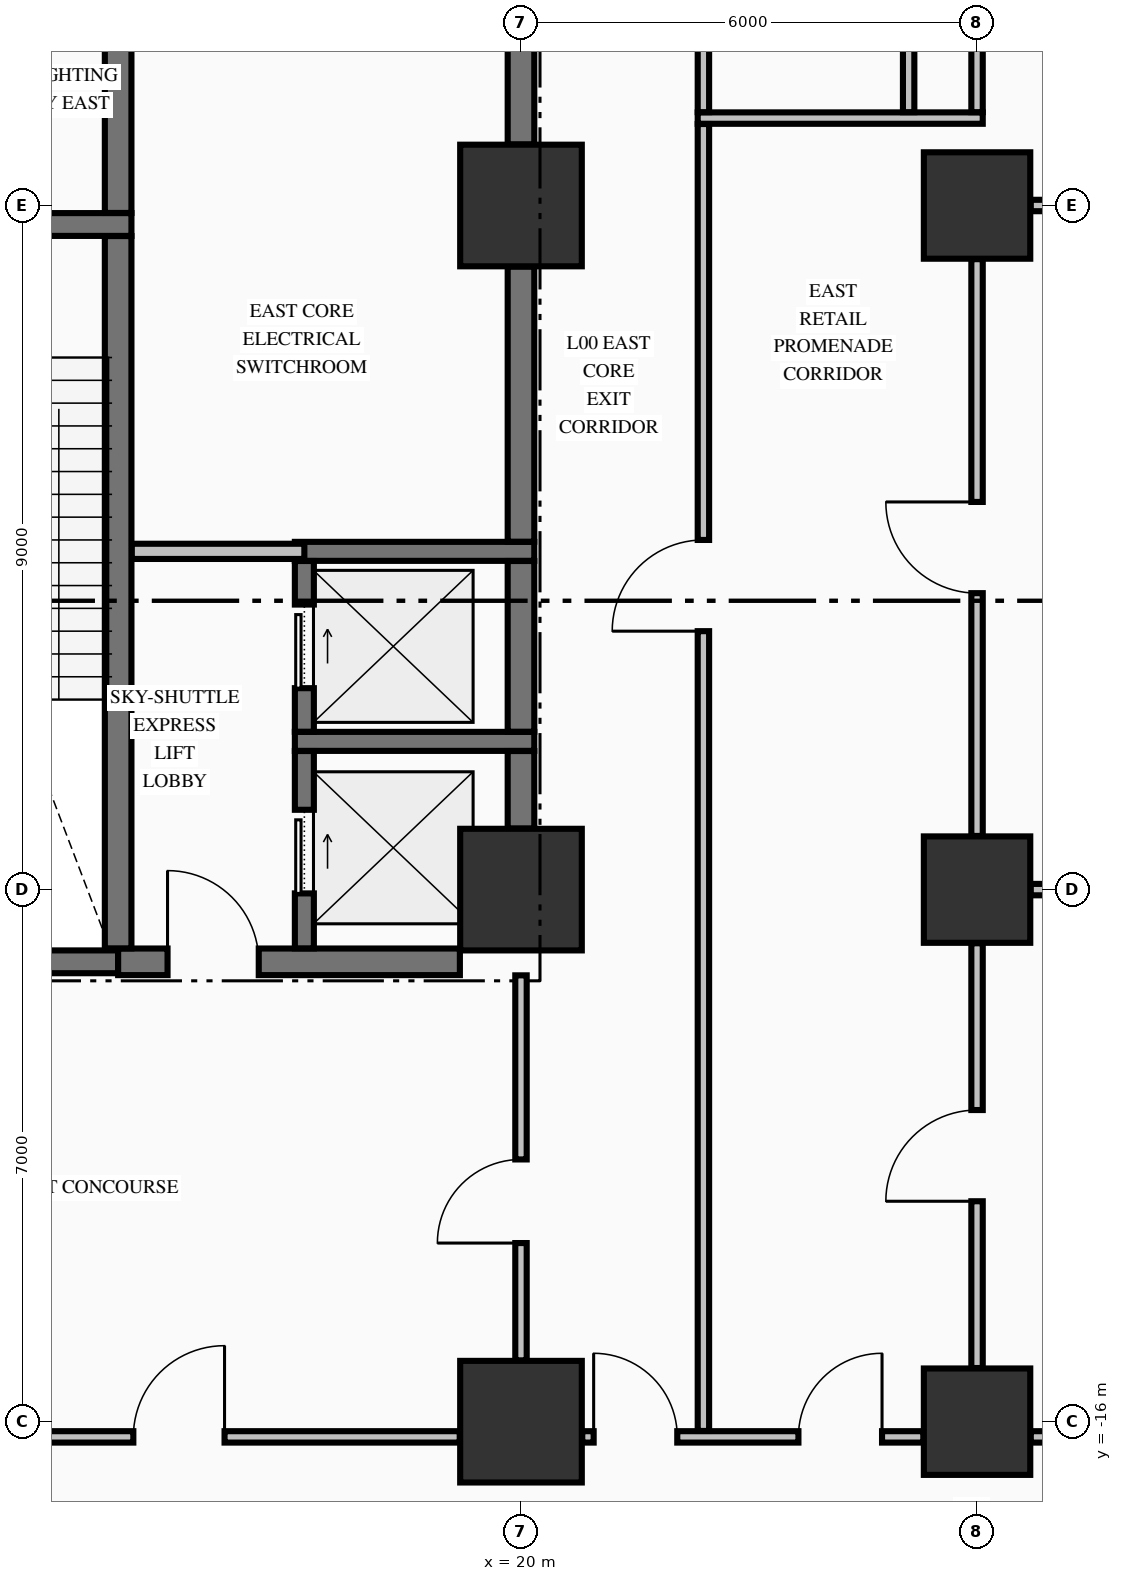
"""IFC4 building model, lengths in metres.
Left out: names, types, materials, properties, quantities, classifications, styles, units other than length and angle.
Written with IfcOpenShell. Run it as: python <this file> out.ifc"""

import sys

from ifc_helpers import new_model, si_unit, direction, frame, frame_2d, origin, origin_2d, place, context, subcontext, project, spatial, rectangle, extrude, element, fill, save


model = new_model("IFC4")
c1 = context("Model", 3, precision=1e-05, world=origin(), true_north=direction((0.0, 1.0)))
c2 = subcontext(c1, "Body", "Model", "MODEL_VIEW")
j1 = project(units=[si_unit("LENGTHUNIT", "METRE"), si_unit("PLANEANGLEUNIT", "RADIAN")], contexts=[c1])
p1 = place(None, origin())
s1 = spatial("IfcSite", under=j1, at=p1, CompositionType="ELEMENT")
p2 = place(p1, origin())
s2 = spatial("IfcBuilding", under=s1, at=p2, CompositionType="ELEMENT")
p3 = place(p2, origin())
s3 = spatial("IfcBuildingStorey", under=s2, at=p3, CompositionType="ELEMENT", Elevation=0.0)
for number, where, z_axis, x_axis in (
    (1, (20.0, -16.0, 0.0), (0.0, 0.0, 1.0), (1.0, 0.0, 0.0)),
    (2, (20.0, -9.0, 0.0), (0.0, 0.0, 1.0), (1.0, 0.0, 0.0)),
    (3, (20.0, 0.0, 0.0), (0.0, 0.0, 1.0), (1.0, 0.0, 0.0)),
):
    element("IfcColumn", number, at=place(p3, frame(where, z_axis=z_axis, x_axis=x_axis)), inside=s3, PredefinedType="COLUMN", context=c2, shape_type="SweptSolid", body=[
        extrude(rectangle(XDim=1.6, YDim=1.6, at=origin_2d()), origin(), (0.0, 0.0, 1.0), 5.09),
    ])
for number, where, z_axis, x_axis in (
    (4, (26.0, -16.0, 0.0), (0.0, 0.0, 1.0), (1.0, 0.0, 0.0)),
    (5, (26.0, -9.0, 0.0), (0.0, 0.0, 1.0), (1.0, 0.0, 0.0)),
    (6, (26.0, 0.0, 0.0), (0.0, 0.0, 1.0), (1.0, 0.0, 0.0)),
):
    element("IfcColumn", number, at=place(p3, frame(where, z_axis=z_axis, x_axis=x_axis)), inside=s3, PredefinedType="COLUMN", context=c2, shape_type="SweptSolid", body=[
        extrude(rectangle(XDim=1.4, YDim=1.4, at=origin_2d()), origin(), (0.0, 0.0, 1.0), 5.09),
    ])
p4 = place(p3, frame((10.85, -9.95, 0.0), z_axis=(0.0, 0.0, 1.0), x_axis=(1.0, 0.0, 0.0)))
e7 = element("IfcWall", 7, at=p4, inside=s3, PredefinedType="SHEAR", context=c2, shape_type="SweptSolid", body=[
    extrude(rectangle(XDim=3.85, YDim=0.3, at=frame_2d((1.925, 0.0))), origin(), (0.0, 0.0, 1.0), 5.09),
])
p5 = place(p3, frame((14.7, -9.95, 0.0), z_axis=(0.0, 0.0, 1.0), x_axis=(1.0, 0.0, 0.0)))
e8 = element("IfcWall", 8, at=p5, inside=s3, PredefinedType="SHEAR", context=c2, shape_type="SweptSolid", body=[
    extrude(rectangle(XDim=4.496, YDim=0.35, at=frame_2d((2.248, 0.0))), origin(), (0.0, 0.0, 1.0), 5.09),
])
p6 = place(p5, frame((0.65, 0.0, 0.0)))
e9 = element("IfcOpeningElement", 9, at=p6, cuts=e8, PredefinedType="OPENING", context=c2, shape_type="SweptSolid", body=[
    extrude(rectangle(XDim=1.2, YDim=2.15, at=frame_2d((0.6, 1.075))), frame((0.0, 0.185, 0.0), z_axis=(0.0, -1.0, 0.0), x_axis=(1.0, 0.0, 0.0)), (0.0, 0.0, 1.0), 0.37),
])
for number, where, z_axis, x_axis in (
    (10, (17.025, -7.05, 0.0), (0.0, 0.0, 1.0), (1.0, 0.0, 0.0)),
    (11, (17.025, -4.55, 0.0), (0.0, 0.0, 1.0), (1.0, 0.0, 0.0)),
):
    element("IfcWall", number, at=place(p3, frame(where, z_axis=z_axis, x_axis=x_axis)), inside=s3, PredefinedType="SOLIDWALL", context=c2, shape_type="SweptSolid", body=[
        extrude(rectangle(XDim=3.15, YDim=0.25, at=frame_2d((1.575, 0.0))), origin(), (0.0, 0.0, 1.0), 5.09),
    ])
p7 = place(p3, frame((11.804, -0.25, 0.0), z_axis=(0.0, 0.0, 1.0), x_axis=(1.0, 0.0, 0.0)))
e12 = element("IfcWall", 12, at=p7, inside=s3, PredefinedType="SHEAR", context=c2, shape_type="SweptSolid", body=[
    extrude(rectangle(XDim=3.071, YDim=0.3, at=frame_2d((1.536, 0.0))), origin(), (0.0, 0.0, 1.0), 5.09),
])
p8 = place(p7, frame((0.796, 0.0, 0.0)))
e13 = element("IfcOpeningElement", 13, at=p8, cuts=e12, PredefinedType="OPENING", context=c2, shape_type="SweptSolid", body=[
    extrude(rectangle(XDim=1.1, YDim=2.15, at=frame_2d((0.55, 1.075))), frame((0.0, 0.16, 0.0), z_axis=(0.0, -1.0, 0.0), x_axis=(1.0, 0.0, 0.0)), (0.0, 0.0, 1.0), 0.32),
])
p9 = place(p3, frame((11.806, -16.2, 0.0), z_axis=(0.0, 0.0, 1.0), x_axis=(1.0, 0.0, 0.0)))
e14 = element("IfcWall", 14, at=p9, inside=s3, PredefinedType="PARTITIONING", context=c2, shape_type="SweptSolid", body=[
    extrude(rectangle(XDim=7.388, YDim=0.15, at=frame_2d((3.694, 0.0))), origin(), (0.0, 0.0, 1.0), 4.132),
])
p10 = place(p9, frame((3.094, 0.0, 0.0)))
e15 = element("IfcOpeningElement", 15, at=p10, cuts=e14, PredefinedType="OPENING", context=c2, shape_type="SweptSolid", body=[
    extrude(rectangle(XDim=1.2, YDim=2.15, at=frame_2d((0.6, 1.075))), frame((0.0, 0.085, 0.0), z_axis=(0.0, -1.0, 0.0), x_axis=(1.0, 0.0, 0.0)), (0.0, 0.0, 1.0), 0.17),
])
p11 = place(p3, frame((20.806, -16.2, 0.0), z_axis=(0.0, 0.0, 1.0), x_axis=(1.0, 0.0, 0.0)))
e16 = element("IfcWall", 16, at=p11, inside=s3, PredefinedType="PARTITIONING", context=c2, shape_type="SweptSolid", body=[
    extrude(rectangle(XDim=4.488, YDim=0.15, at=frame_2d((2.244, 0.0))), origin(), (0.0, 0.0, 1.0), 4.132),
])
p12 = place(p11, frame((0.15, 0.0, 0.0)))
e17 = element("IfcOpeningElement", 17, at=p12, cuts=e16, PredefinedType="OPENING", context=c2, shape_type="SweptSolid", body=[
    extrude(rectangle(XDim=1.1, YDim=2.15, at=frame_2d((0.55, 1.075))), frame((0.0, 0.085, 0.0), z_axis=(0.0, -1.0, 0.0), x_axis=(1.0, 0.0, 0.0)), (0.0, 0.0, 1.0), 0.17),
])
p13 = place(p11, frame((2.844, 0.0, 0.0)))
e18 = element("IfcOpeningElement", 18, at=p13, cuts=e16, PredefinedType="OPENING", context=c2, shape_type="SweptSolid", body=[
    extrude(rectangle(XDim=1.1, YDim=2.15, at=frame_2d((0.55, 1.075))), frame((0.0, 0.085, 0.0), z_axis=(0.0, -1.0, 0.0), x_axis=(1.0, 0.0, 0.0)), (0.0, 0.0, 1.0), 0.17),
])
for number, where, z_axis, x_axis in (
    (19, (26.706, -16.2, 0.0), (0.0, 0.0, 1.0), (1.0, 0.0, 0.0)),
    (20, (26.706, -9.0, 0.0), (0.0, 0.0, 1.0), (1.0, 0.0, 0.0)),
):
    element("IfcWall", number, at=place(p3, frame(where, z_axis=z_axis, x_axis=x_axis)), inside=s3, PredefinedType="PARTITIONING", context=c2, shape_type="SweptSolid", body=[
        extrude(rectangle(XDim=2.588, YDim=0.15, at=frame_2d((1.294, 0.0))), origin(), (0.0, 0.0, 1.0), 4.132),
    ])
p14 = place(p3, frame((14.878, -4.55, 0.0), z_axis=(0.0, 0.0, 1.0), x_axis=(1.0, 0.0, 0.0)))
e21 = element("IfcWall", 21, at=p14, inside=s3, PredefinedType="PARTITIONING", context=c2, shape_type="SweptSolid", body=[
    extrude(rectangle(XDim=2.272, YDim=0.2, at=frame_2d((1.136, 0.0))), origin(), (0.0, 0.0, 1.0), 5.09),
])
p15 = place(p3, frame((26.706, 0.0, 0.0), z_axis=(0.0, 0.0, 1.0), x_axis=(1.0, 0.0, 0.0)))
e22 = element("IfcWall", 22, at=p15, inside=s3, PredefinedType="PARTITIONING", context=c2, shape_type="SweptSolid", body=[
    extrude(rectangle(XDim=2.588, YDim=0.15, at=frame_2d((1.294, 0.0))), origin(), (0.0, 0.0, 1.0), 4.132),
])
p16 = place(p3, frame((22.325, 1.15, 0.0), z_axis=(0.0, 0.0, 1.0), x_axis=(1.0, 0.0, 0.0)))
e23 = element("IfcWall", 23, at=p16, inside=s3, PredefinedType="PARTITIONING", context=c2, shape_type="SweptSolid", body=[
    extrude(rectangle(XDim=3.75, YDim=0.15, at=frame_2d((1.875, 0.0))), origin(), (0.0, 0.0, 1.0), 5.09),
])
p17 = place(p3, frame((14.7, -9.773, 0.0), z_axis=(0.0, 0.0, 1.0), x_axis=(0.0, 1.0, 0.0)))
e24 = element("IfcWall", 24, at=p17, inside=s3, PredefinedType="SHEAR", context=c2, shape_type="SweptSolid", body=[
    extrude(rectangle(XDim=9.371, YDim=0.35, at=frame_2d((4.686, 0.0))), origin(), (0.0, 0.0, 1.0), 5.09),
])
p18 = place(p3, frame((14.7, -0.098, 0.0), z_axis=(0.0, 0.0, 1.0), x_axis=(0.0, 1.0, 0.0)))
e25 = element("IfcWall", 25, at=p18, inside=s3, PredefinedType="SHEAR", context=c2, shape_type="SweptSolid", body=[
    extrude(rectangle(XDim=2.846, YDim=0.35, at=frame_2d((1.423, 0.0))), origin(), (0.0, 0.0, 1.0), 5.09),
])
p19 = place(p3, frame((17.15, -9.773, 0.0), z_axis=(0.0, 0.0, 1.0), x_axis=(0.0, 1.0, 0.0)))
e26 = element("IfcWall", 26, at=p19, inside=s3, PredefinedType="SOLIDWALL", context=c2, shape_type="SweptSolid", body=[
    extrude(rectangle(XDim=2.596, YDim=0.25, at=frame_2d((1.298, 0.0))), origin(), (0.0, 0.0, 1.0), 5.09),
])
p20 = place(p19, frame((0.723, 0.0, 0.0)))
e27 = element("IfcOpeningElement", 27, at=p20, cuts=e26, PredefinedType="OPENING", context=c2, shape_type="SweptSolid", body=[
    extrude(rectangle(XDim=1.1, YDim=2.2, at=frame_2d((0.55, 1.1))), frame((0.0, 0.135, 0.0), z_axis=(0.0, -1.0, 0.0), x_axis=(1.0, 0.0, 0.0)), (0.0, 0.0, 1.0), 0.27),
])
p21 = place(p3, frame((17.15, -6.923, 0.0), z_axis=(0.0, 0.0, 1.0), x_axis=(0.0, 1.0, 0.0)))
e28 = element("IfcWall", 28, at=p21, inside=s3, PredefinedType="SOLIDWALL", context=c2, shape_type="SweptSolid", body=[
    extrude(rectangle(XDim=2.246, YDim=0.25, at=frame_2d((1.123, 0.0))), origin(), (0.0, 0.0, 1.0), 5.09),
])
p22 = place(p21, frame((0.573, 0.0, 0.0)))
e29 = element("IfcOpeningElement", 29, at=p22, cuts=e28, PredefinedType="OPENING", context=c2, shape_type="SweptSolid", body=[
    extrude(rectangle(XDim=1.1, YDim=2.2, at=frame_2d((0.55, 1.1))), frame((0.0, 0.135, 0.0), z_axis=(0.0, -1.0, 0.0), x_axis=(1.0, 0.0, 0.0)), (0.0, 0.0, 1.0), 0.27),
])
p23 = place(p3, frame((20.0, -8.196, 0.0), z_axis=(0.0, 0.0, 1.0), x_axis=(0.0, 1.0, 0.0)))
e30 = element("IfcWall", 30, at=p23, inside=s3, PredefinedType="SHEAR", context=c2, shape_type="SweptSolid", body=[
    extrude(rectangle(XDim=1.019, YDim=0.35, at=frame_2d((0.51, 0.0))), origin(), (0.0, 0.0, 1.0), 5.09),
])
p24 = place(p3, frame((20.0, -6.923, 0.0), z_axis=(0.0, 0.0, 1.0), x_axis=(0.0, 1.0, 0.0)))
e31 = element("IfcWall", 31, at=p24, inside=s3, PredefinedType="SHEAR", context=c2, shape_type="SweptSolid", body=[
    extrude(rectangle(XDim=2.246, YDim=0.35, at=frame_2d((1.123, 0.0))), origin(), (0.0, 0.0, 1.0), 5.09),
])
p25 = place(p3, frame((20.0, -4.423, 0.0), z_axis=(0.0, 0.0, 1.0), x_axis=(0.0, 1.0, 0.0)))
e32 = element("IfcWall", 32, at=p25, inside=s3, PredefinedType="SHEAR", context=c2, shape_type="SweptSolid", body=[
    extrude(rectangle(XDim=3.619, YDim=0.35, at=frame_2d((1.81, 0.0))), origin(), (0.0, 0.0, 1.0), 5.09),
])
p26 = place(p3, frame((20.0, 0.804, 0.0), z_axis=(0.0, 0.0, 1.0), x_axis=(0.0, 1.0, 0.0)))
e33 = element("IfcWall", 33, at=p26, inside=s3, PredefinedType="SHEAR", context=c2, shape_type="SweptSolid", body=[
    extrude(rectangle(XDim=7.392, YDim=0.35, at=frame_2d((3.696, 0.0))), origin(), (0.0, 0.0, 1.0), 5.09),
])
p27 = place(p3, frame((20.0, -15.194, 0.0), z_axis=(0.0, 0.0, 1.0), x_axis=(0.0, 1.0, 0.0)))
e34 = element("IfcWall", 34, at=p27, inside=s3, PredefinedType="PARTITIONING", context=c2, shape_type="SweptSolid", body=[
    extrude(rectangle(XDim=5.066, YDim=0.15, at=frame_2d((2.533, 0.0))), origin(), (0.0, 0.0, 1.0), 4.132),
])
p28 = place(p27, frame((1.544, 0.0, 0.0)))
e35 = element("IfcOpeningElement", 35, at=p28, cuts=e34, PredefinedType="OPENING", context=c2, shape_type="SweptSolid", body=[
    extrude(rectangle(XDim=1.1, YDim=2.15, at=frame_2d((0.55, 1.075))), frame((0.0, 0.085, 0.0), z_axis=(0.0, -1.0, 0.0), x_axis=(1.0, 0.0, 0.0)), (0.0, 0.0, 1.0), 0.17),
])
p29 = place(p3, frame((22.4, -16.122, 0.0), z_axis=(0.0, 0.0, 1.0), x_axis=(0.0, 1.0, 0.0)))
e36 = element("IfcWall", 36, at=p29, inside=s3, PredefinedType="PARTITIONING", context=c2, shape_type="SweptSolid", body=[
    extrude(rectangle(XDim=17.194, YDim=0.15, at=frame_2d((8.597, 0.0))), origin(), (0.0, 0.0, 1.0), 5.09),
])
p30 = place(p29, frame((10.522, 0.0, 0.0)))
e37 = element("IfcOpeningElement", 37, at=p30, cuts=e36, PredefinedType="OPENING", context=c2, shape_type="SweptSolid", body=[
    extrude(rectangle(XDim=1.2, YDim=2.15, at=frame_2d((0.6, 1.075))), frame((0.0, 0.085, 0.0), z_axis=(0.0, -1.0, 0.0), x_axis=(1.0, 0.0, 0.0)), (0.0, 0.0, 1.0), 0.17),
])
p31 = place(p3, frame((22.4, 1.228, 0.0), z_axis=(0.0, 0.0, 1.0), x_axis=(0.0, 1.0, 0.0)))
e38 = element("IfcWall", 38, at=p31, inside=s3, PredefinedType="PARTITIONING", context=c2, shape_type="SweptSolid", body=[
    extrude(rectangle(XDim=6.544, YDim=0.15, at=frame_2d((3.272, 0.0))), origin(), (0.0, 0.0, 1.0), 5.09),
])
p32 = place(p31, frame((2.772, 0.0, 0.0)))
e39 = element("IfcOpeningElement", 39, at=p32, cuts=e38, PredefinedType="OPENING", context=c2, shape_type="SweptSolid", body=[
    extrude(rectangle(XDim=1.0, YDim=2.15, at=frame_2d((0.5, 1.075))), frame((0.0, 0.085, 0.0), z_axis=(0.0, -1.0, 0.0), x_axis=(1.0, 0.0, 0.0)), (0.0, 0.0, 1.0), 0.17),
])
p33 = place(p3, frame((25.1, 1.228, 0.0), z_axis=(0.0, 0.0, 1.0), x_axis=(0.0, 1.0, 0.0)))
e40 = element("IfcWall", 40, at=p33, inside=s3, PredefinedType="PARTITIONING", context=c2, shape_type="SweptSolid", body=[
    extrude(rectangle(XDim=6.544, YDim=0.15, at=frame_2d((3.272, 0.0))), origin(), (0.0, 0.0, 1.0), 5.09),
])
p34 = place(p3, frame((26.0, -15.294, 0.0), z_axis=(0.0, 0.0, 1.0), x_axis=(0.0, 1.0, 0.0)))
e41 = element("IfcWall", 41, at=p34, inside=s3, PredefinedType="PARTITIONING", context=c2, shape_type="SweptSolid", body=[
    extrude(rectangle(XDim=5.588, YDim=0.15, at=frame_2d((2.794, 0.0))), origin(), (0.0, 0.0, 1.0), 4.132),
])
p35 = place(p34, frame((2.194, 0.0, 0.0)))
e42 = element("IfcOpeningElement", 42, at=p35, cuts=e41, PredefinedType="OPENING", context=c2, shape_type="SweptSolid", body=[
    extrude(rectangle(XDim=1.2, YDim=2.15, at=frame_2d((0.6, 1.075))), frame((0.0, 0.085, 0.0), z_axis=(0.0, -1.0, 0.0), x_axis=(1.0, 0.0, 0.0)), (0.0, 0.0, 1.0), 0.17),
])
p36 = place(p3, frame((26.0, -8.294, 0.0), z_axis=(0.0, 0.0, 1.0), x_axis=(0.0, 1.0, 0.0)))
e43 = element("IfcWall", 43, at=p36, inside=s3, PredefinedType="PARTITIONING", context=c2, shape_type="SweptSolid", body=[
    extrude(rectangle(XDim=7.588, YDim=0.15, at=frame_2d((3.794, 0.0))), origin(), (0.0, 0.0, 1.0), 4.132),
])
p37 = place(p36, frame((3.194, 0.0, 0.0)))
e44 = element("IfcOpeningElement", 44, at=p37, cuts=e43, PredefinedType="OPENING", context=c2, shape_type="SweptSolid", body=[
    extrude(rectangle(XDim=1.2, YDim=2.15, at=frame_2d((0.6, 1.075))), frame((0.0, 0.085, 0.0), z_axis=(0.0, -1.0, 0.0), x_axis=(1.0, 0.0, 0.0)), (0.0, 0.0, 1.0), 0.17),
])
p38 = place(p3, frame((26.0, 1.228, 0.0), z_axis=(0.0, 0.0, 1.0), x_axis=(0.0, 1.0, 0.0)))
e45 = element("IfcWall", 45, at=p38, inside=s3, PredefinedType="PARTITIONING", context=c2, shape_type="SweptSolid", body=[
    extrude(rectangle(XDim=6.544, YDim=0.15, at=frame_2d((3.272, 0.0))), origin(), (0.0, 0.0, 1.0), 4.132),
])
p39 = place(p20, origin())
e46 = element("IfcDoor", 46, at=p39, inside=s3, OperationType="SLIDING_TO_RIGHT", PredefinedType="DOOR", context=c2, shape_type="SweptSolid", body=[
    extrude(rectangle(XDim=1.1, YDim=2.2, at=frame_2d((0.55, 1.1))), frame((0.0, 0.025, 0.0), z_axis=(0.0, -1.0, 0.0), x_axis=(1.0, 0.0, 0.0)), (0.0, 0.0, 1.0), 0.05),
])
fill(e27, e46)
p40 = place(p22, origin())
e47 = element("IfcDoor", 47, at=p40, inside=s3, OperationType="SLIDING_TO_RIGHT", PredefinedType="DOOR", context=c2, shape_type="SweptSolid", body=[
    extrude(rectangle(XDim=1.1, YDim=2.2, at=frame_2d((0.55, 1.1))), frame((0.0, 0.025, 0.0), z_axis=(0.0, -1.0, 0.0), x_axis=(1.0, 0.0, 0.0)), (0.0, 0.0, 1.0), 0.05),
])
fill(e29, e47)
p41 = place(p6, origin())
e48 = element("IfcDoor", 48, at=p41, inside=s3, OperationType="SINGLE_SWING_LEFT", PredefinedType="DOOR", context=c2, shape_type="SweptSolid", body=[
    extrude(rectangle(XDim=1.2, YDim=2.15, at=frame_2d((0.6, 1.075))), frame((0.0, 0.025, 0.0), z_axis=(0.0, -1.0, 0.0), x_axis=(1.0, 0.0, 0.0)), (0.0, 0.0, 1.0), 0.05),
])
fill(e9, e48)
p42 = place(p28, origin())
e49 = element("IfcDoor", 49, at=p42, inside=s3, OperationType="SINGLE_SWING_LEFT", PredefinedType="DOOR", context=c2, shape_type="SweptSolid", body=[
    extrude(rectangle(XDim=1.1, YDim=2.15, at=frame_2d((0.55, 1.075))), frame((0.0, 0.025, 0.0), z_axis=(0.0, -1.0, 0.0), x_axis=(1.0, 0.0, 0.0)), (0.0, 0.0, 1.0), 0.05),
])
fill(e35, e49)
p43 = place(p10, origin())
e50 = element("IfcDoor", 50, at=p43, inside=s3, OperationType="SINGLE_SWING_RIGHT", PredefinedType="DOOR", context=c2, shape_type="SweptSolid", body=[
    extrude(rectangle(XDim=1.2, YDim=2.15, at=frame_2d((0.6, 1.075))), frame((0.0, 0.025, 0.0), z_axis=(0.0, -1.0, 0.0), x_axis=(1.0, 0.0, 0.0)), (0.0, 0.0, 1.0), 0.05),
])
fill(e15, e50)
p44 = place(p12, origin())
e51 = element("IfcDoor", 51, at=p44, inside=s3, OperationType="SINGLE_SWING_LEFT", PredefinedType="DOOR", context=c2, shape_type="SweptSolid", body=[
    extrude(rectangle(XDim=1.1, YDim=2.15, at=frame_2d((0.55, 1.075))), frame((0.0, 0.025, 0.0), z_axis=(0.0, -1.0, 0.0), x_axis=(1.0, 0.0, 0.0)), (0.0, 0.0, 1.0), 0.05),
])
fill(e17, e51)
p45 = place(p30, origin())
e52 = element("IfcDoor", 52, at=p45, inside=s3, OperationType="SINGLE_SWING_LEFT", PredefinedType="DOOR", context=c2, shape_type="SweptSolid", body=[
    extrude(rectangle(XDim=1.2, YDim=2.15, at=frame_2d((0.6, 1.075))), frame((0.0, 0.025, 0.0), z_axis=(0.0, -1.0, 0.0), x_axis=(1.0, 0.0, 0.0)), (0.0, 0.0, 1.0), 0.05),
])
fill(e37, e52)
p46 = place(p13, origin())
e53 = element("IfcDoor", 53, at=p46, inside=s3, OperationType="SINGLE_SWING_RIGHT", PredefinedType="DOOR", context=c2, shape_type="SweptSolid", body=[
    extrude(rectangle(XDim=1.1, YDim=2.15, at=frame_2d((0.55, 1.075))), frame((0.0, 0.025, 0.0), z_axis=(0.0, -1.0, 0.0), x_axis=(1.0, 0.0, 0.0)), (0.0, 0.0, 1.0), 0.05),
])
fill(e18, e53)
p47 = place(p35, origin())
e54 = element("IfcDoor", 54, at=p47, inside=s3, OperationType="SINGLE_SWING_LEFT", PredefinedType="DOOR", context=c2, shape_type="SweptSolid", body=[
    extrude(rectangle(XDim=1.2, YDim=2.15, at=frame_2d((0.6, 1.075))), frame((0.0, 0.025, 0.0), z_axis=(0.0, -1.0, 0.0), x_axis=(1.0, 0.0, 0.0)), (0.0, 0.0, 1.0), 0.05),
])
fill(e42, e54)
p48 = place(p37, origin())
e55 = element("IfcDoor", 55, at=p48, inside=s3, OperationType="SINGLE_SWING_RIGHT", PredefinedType="DOOR", context=c2, shape_type="SweptSolid", body=[
    extrude(rectangle(XDim=1.2, YDim=2.15, at=frame_2d((0.6, 1.075))), frame((0.0, 0.025, 0.0), z_axis=(0.0, -1.0, 0.0), x_axis=(1.0, 0.0, 0.0)), (0.0, 0.0, 1.0), 0.05),
])
fill(e44, e55)
save(model, sys.argv[1])
